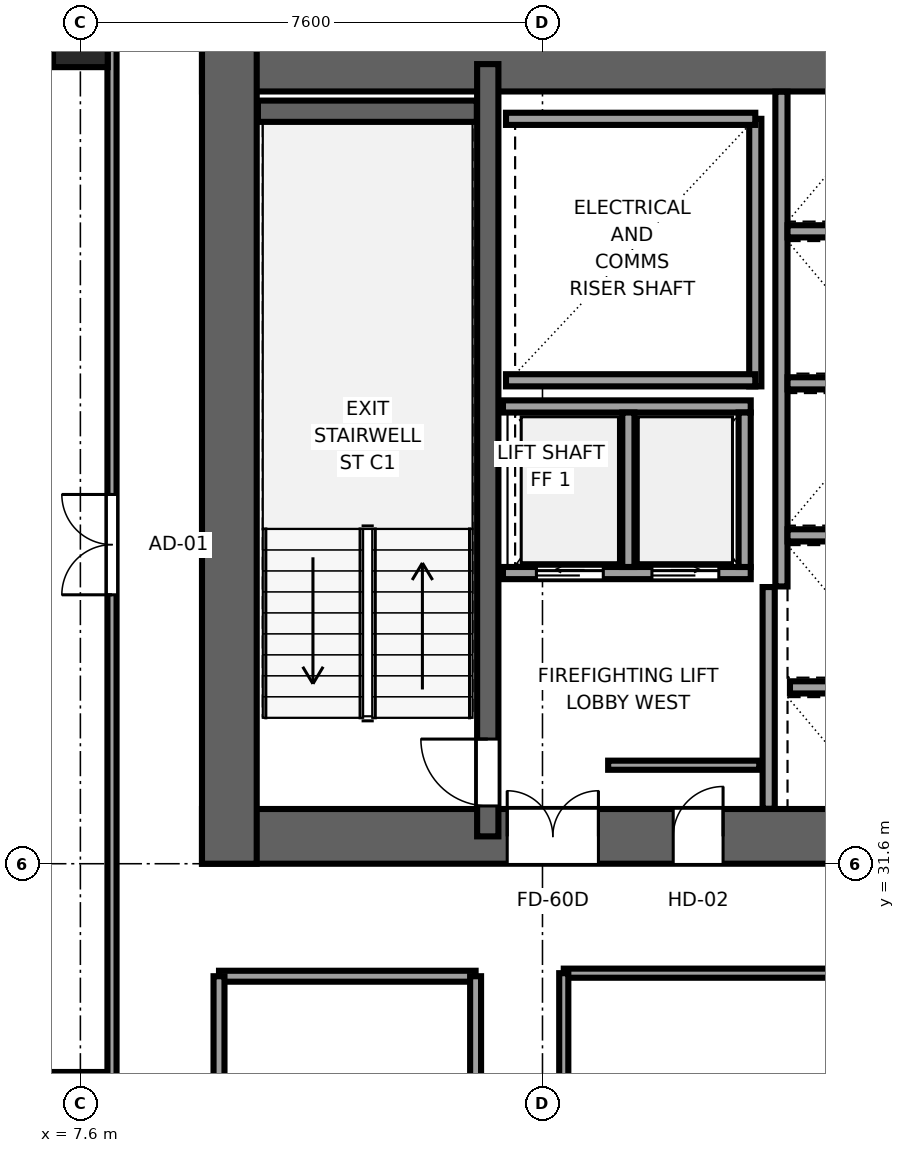
"""IFC4 building model, lengths in metres.
Left out: names, types, materials, properties, quantities, classifications, styles, units other than length and angle.
Written with IfcOpenShell. Run it as: python <this file> out.ifc"""

import sys

from ifc_helpers import new_model, si_unit, direction, frame, frame_2d, origin, origin_2d, place, context, subcontext, project, spatial, rectangle, extrude, source, transform, mapped, element, fill, save


model = new_model("IFC4")
c1 = context("Model", 3, precision=1e-05, world=origin(), true_north=direction((0.0, 1.0)))
c2 = subcontext(c1, "Body", "Model", "MODEL_VIEW")
j1 = project(units=[si_unit("LENGTHUNIT", "METRE"), si_unit("PLANEANGLEUNIT", "RADIAN")], contexts=[c1])
p1 = place(None, origin())
s1 = spatial("IfcSite", under=j1, at=p1, CompositionType="ELEMENT")
p2 = place(p1, origin())
s2 = spatial("IfcBuilding", under=s1, at=p2, CompositionType="ELEMENT")
p3 = place(p2, frame((0.0, 0.0, 88.8)))
s3 = spatial("IfcBuildingStorey", under=s2, at=p3, CompositionType="ELEMENT", Elevation=88.8)
p4 = place(p3, frame((9.6, 32.05, 0.0), z_axis=(0.0, 0.0, 1.0), x_axis=(1.0, 0.0, 0.0)))
e1 = element("IfcWall", 1, at=p4, inside=s3, PredefinedType="SHEAR", context=c2, shape_type="SweptSolid", body=[
    extrude(rectangle(XDim=26.8, YDim=0.9, at=frame_2d((13.4, 0.0))), origin(), (0.0, 0.0, 1.0), 3.55),
])
p5 = place(p4, frame((6.52, 0.0, 0.0), z_axis=(0.0, 0.0, 1.0), x_axis=(-1.0, 0.0, 0.0)))
e2 = element("IfcOpeningElement", 2, at=p5, cuts=e1, PredefinedType="OPENING", context=c2, shape_type="SweptSolid", body=[
    extrude(rectangle(XDim=1.5, YDim=2.04, at=frame_2d((0.75, 1.02))), frame((0.0, 0.46, 0.0), z_axis=(0.0, -1.0, 0.0), x_axis=(1.0, 0.0, 0.0)), (0.0, 0.0, 1.0), 0.92),
])
p6 = place(p4, frame((14.15, 0.0, 0.0), z_axis=(0.0, 0.0, 1.0), x_axis=(-1.0, 0.0, 0.0)))
e3 = element("IfcOpeningElement", 3, at=p6, cuts=e1, PredefinedType="OPENING", context=c2, shape_type="SweptSolid", body=[
    extrude(rectangle(XDim=1.5, YDim=2.04, at=frame_2d((0.75, 1.02))), frame((0.0, 0.46, 0.0), z_axis=(0.0, -1.0, 0.0), x_axis=(1.0, 0.0, 0.0)), (0.0, 0.0, 1.0), 0.92),
])
p7 = place(p4, frame((20.45, 0.0, 0.0), z_axis=(0.0, 0.0, 1.0), x_axis=(-1.0, 0.0, 0.0)))
e4 = element("IfcOpeningElement", 4, at=p7, cuts=e1, PredefinedType="OPENING", context=c2, shape_type="SweptSolid", body=[
    extrude(rectangle(XDim=1.5, YDim=2.04, at=frame_2d((0.75, 1.02))), frame((0.0, 0.46, 0.0), z_axis=(0.0, -1.0, 0.0), x_axis=(1.0, 0.0, 0.0)), (0.0, 0.0, 1.0), 0.92),
])
p8 = place(p4, frame((8.57, 0.0, 0.0), z_axis=(0.0, 0.0, 1.0), x_axis=(-1.0, 0.0, 0.0)))
e5 = element("IfcOpeningElement", 5, at=p8, cuts=e1, PredefinedType="OPENING", context=c2, shape_type="SweptSolid", body=[
    extrude(rectangle(XDim=0.82, YDim=2.01, at=frame_2d((0.41, 1.005))), frame((0.0, 0.46, 0.0), z_axis=(0.0, -1.0, 0.0), x_axis=(1.0, 0.0, 0.0)), (0.0, 0.0, 1.0), 0.92),
])
p9 = place(p3, frame((9.6, 44.75, 0.0), z_axis=(0.0, 0.0, 1.0), x_axis=(1.0, 0.0, 0.0)))
e6 = element("IfcWall", 6, at=p9, inside=s3, PredefinedType="SHEAR", context=c2, shape_type="SweptSolid", body=[
    extrude(rectangle(XDim=26.8, YDim=0.9, at=frame_2d((13.4, 0.0))), origin(), (0.0, 0.0, 1.0), 3.55),
])
p10 = place(p3, frame((10.05, 31.6, 0.0), z_axis=(0.0, 0.0, 1.0), x_axis=(0.0, 1.0, 0.0)))
e7 = element("IfcWall", 7, at=p10, inside=s3, PredefinedType="SHEAR", context=c2, shape_type="SweptSolid", body=[
    extrude(rectangle(XDim=13.6, YDim=0.9, at=frame_2d((6.8, 0.0))), origin(), (0.0, 0.0, 1.0), 3.55),
])
p11 = place(p3, frame((14.3, 32.05, 0.0), z_axis=(0.0, 0.0, 1.0), x_axis=(0.0, 1.0, 0.0)))
e8 = element("IfcWall", 8, at=p11, inside=s3, PredefinedType="SHEAR", context=c2, shape_type="SweptSolid", body=[
    extrude(rectangle(XDim=12.7, YDim=0.35, at=frame_2d((6.35, 0.0))), origin(), (0.0, 0.0, 1.0), 3.55),
])
p12 = place(p11, frame((0.5, 0.0, 0.0)))
e9 = element("IfcOpeningElement", 9, at=p12, cuts=e8, PredefinedType="OPENING", context=c2, shape_type="SweptSolid", body=[
    extrude(rectangle(XDim=1.1, YDim=2.12, at=frame_2d((0.55, 1.06))), frame((0.0, 0.185, 0.0), z_axis=(0.0, -1.0, 0.0), x_axis=(1.0, 0.0, 0.0)), (0.0, 0.0, 1.0), 0.37),
])
p13 = place(p3, frame((10.52, 43.975, 0.0), z_axis=(0.0, 0.0, 1.0), x_axis=(1.0, 0.0, 0.0)))
e10 = element("IfcWall", 10, at=p13, inside=s3, PredefinedType="SHEAR", context=c2, shape_type="SweptSolid", body=[
    extrude(rectangle(XDim=3.6, YDim=0.35, at=frame_2d((1.8, 0.0))), origin(), (0.0, 0.0, 1.0), 3.55),
])
m1 = source(origin(), c2, "Body", "SweptSolid", [
    extrude(rectangle(XDim=0.9, YDim=0.9, at=origin_2d()), origin(), (0.0, 0.0, 1.0), 3.55),
])
p14 = place(p3, frame((7.6, 45.15, 0.0), z_axis=(0.0, 0.0, 1.0), x_axis=(1.0, 0.0, 0.0)))
e11 = element("IfcColumn", 11, at=p14, inside=s3, PredefinedType="COLUMN", context=c2, shape_type="MappedRepresentation", body=[
    mapped(m1, transform((0.0, 0.0, 0.0), x_axis=(1.0, 0.0, 0.0), y_axis=(0.0, 1.0, 0.0), z_axis=(0.0, 0.0, 1.0), scale=1.0)),
])
p15 = place(p3, frame((18.7, 39.45, 0.0), z_axis=(0.0, 0.0, 1.0), x_axis=(0.0, 1.0, 0.0)))
e12 = element("IfcWall", 12, at=p15, inside=s3, PredefinedType="SOLIDWALL", context=c2, shape_type="SweptSolid", body=[
    extrude(rectangle(XDim=4.4, YDim=0.2, at=frame_2d((2.2, 0.0))), origin(), (0.0, 0.0, 1.0), 3.37),
])
for number, where, z_axis, x_axis in (
    (13, (14.6, 39.55, 0.0), (0.0, 0.0, 1.0), (1.0, 0.0, 0.0)),
    (14, (14.6, 43.85, 0.0), (0.0, 0.0, 1.0), (1.0, 0.0, 0.0)),
):
    element("IfcWall", number, at=place(p3, frame(where, z_axis=z_axis, x_axis=x_axis)), inside=s3, PredefinedType="SOLIDWALL", context=c2, shape_type="SweptSolid", body=[
        extrude(rectangle(XDim=4.1, YDim=0.2, at=frame_2d((2.05, 0.0))), origin(), (0.0, 0.0, 1.0), 3.37),
    ])
p16 = place(p3, frame((18.92, 32.504, 0.0), z_axis=(0.0, 0.0, 1.0), x_axis=(0.0, 1.0, 0.0)))
e15 = element("IfcWall", 15, at=p16, inside=s3, PredefinedType="SOLIDWALL", context=c2, shape_type="SweptSolid", body=[
    extrude(rectangle(XDim=3.646, YDim=0.2, at=frame_2d((1.823, 0.0))), origin(), (0.0, 0.0, 1.0), 3.37),
])
p17 = place(p3, frame((19.13, 36.16, 0.0), z_axis=(0.0, 0.0, 1.0), x_axis=(0.0, 1.0, 0.0)))
e16 = element("IfcWall", 16, at=p17, inside=s3, PredefinedType="SOLIDWALL", context=c2, shape_type="SweptSolid", body=[
    extrude(rectangle(XDim=8.136, YDim=0.2, at=frame_2d((4.068, 0.0))), origin(), (0.0, 0.0, 1.0), 3.37),
])
p18 = place(p3, frame((19.27, 34.5, 0.0), z_axis=(0.0, 0.0, 1.0), x_axis=(1.0, 0.0, 0.0)))
e17 = element("IfcWall", 17, at=p18, inside=s3, PredefinedType="SOLIDWALL", context=c2, shape_type="SweptSolid", body=[
    extrude(rectangle(XDim=1.8, YDim=0.2, at=frame_2d((0.9, 0.0))), origin(), (0.0, 0.0, 1.0), 3.37),
])
for number, where, z_axis, x_axis in (
    (18, (19.23, 37.0, 0.0), (0.0, 0.0, 1.0), (1.0, 0.0, 0.0)),
    (19, (19.23, 39.5, 0.0), (0.0, 0.0, 1.0), (1.0, 0.0, 0.0)),
    (20, (19.23, 42.0, 0.0), (0.0, 0.0, 1.0), (1.0, 0.0, 0.0)),
):
    element("IfcWall", number, at=place(p3, frame(where, z_axis=z_axis, x_axis=x_axis)), inside=s3, PredefinedType="SOLIDWALL", context=c2, shape_type="SweptSolid", body=[
        extrude(rectangle(XDim=1.84, YDim=0.2, at=frame_2d((0.92, 0.0))), origin(), (0.0, 0.0, 1.0), 3.37),
    ])
p19 = place(p3, frame((14.55, 36.38, 0.0), z_axis=(0.0, 0.0, 1.0), x_axis=(1.0, 0.0, 0.0)))
e21 = element("IfcWall", 21, at=p19, inside=s3, PredefinedType="SOLIDWALL", context=c2, shape_type="SweptSolid", body=[
    extrude(rectangle(XDim=4.075, YDim=0.2, at=frame_2d((2.038, 0.0))), origin(), (0.0, 0.0, 1.0), 3.37),
])
p20 = place(p19, frame((0.55, 0.0, 0.0)))
e22 = element("IfcOpeningElement", 22, at=p20, cuts=e21, PredefinedType="OPENING", context=c2, shape_type="SweptSolid", body=[
    extrude(rectangle(XDim=1.1, YDim=2.12, at=frame_2d((0.55, 1.06))), frame((0.0, 0.11, 0.0), z_axis=(0.0, -1.0, 0.0), x_axis=(1.0, 0.0, 0.0)), (0.0, 0.0, 1.0), 0.22),
])
p21 = place(p19, frame((2.45, 0.0, 0.0)))
e23 = element("IfcOpeningElement", 23, at=p21, cuts=e21, PredefinedType="OPENING", context=c2, shape_type="SweptSolid", body=[
    extrude(rectangle(XDim=1.1, YDim=2.12, at=frame_2d((0.55, 1.06))), frame((0.0, 0.11, 0.0), z_axis=(0.0, -1.0, 0.0), x_axis=(1.0, 0.0, 0.0)), (0.0, 0.0, 1.0), 0.22),
])
p22 = place(p3, frame((14.55, 39.12, 0.0), z_axis=(0.0, 0.0, 1.0), x_axis=(1.0, 0.0, 0.0)))
e24 = element("IfcWall", 24, at=p22, inside=s3, PredefinedType="SOLIDWALL", context=c2, shape_type="SweptSolid", body=[
    extrude(rectangle(XDim=4.075, YDim=0.2, at=frame_2d((2.038, 0.0))), origin(), (0.0, 0.0, 1.0), 3.37),
])
for number, where, z_axis, x_axis in (
    (25, (18.525, 36.48, 0.0), (0.0, 0.0, 1.0), (0.0, 1.0, 0.0)),
    (26, (16.613, 36.48, 0.0), (0.0, 0.0, 1.0), (0.0, 1.0, 0.0)),
):
    element("IfcWall", number, at=place(p3, frame(where, z_axis=z_axis, x_axis=x_axis)), inside=s3, PredefinedType="SOLIDWALL", context=c2, shape_type="SweptSolid", body=[
        extrude(rectangle(XDim=2.54, YDim=0.2, at=frame_2d((1.27, 0.0))), origin(), (0.0, 0.0, 1.0), 3.37),
    ])
p23 = place(p3, frame((16.28, 33.22, 0.0), z_axis=(0.0, 0.0, 1.0), x_axis=(1.0, 0.0, 0.0)))
e27 = element("IfcWall", 27, at=p23, inside=s3, PredefinedType="PARTITIONING", context=c2, shape_type="SweptSolid", body=[
    extrude(rectangle(XDim=2.485, YDim=0.15, at=frame_2d((1.242, 0.0))), origin(), (0.0, 0.0, 1.0), 3.37),
])
p24 = place(p3, frame((0.405, 28.1, 0.0), z_axis=(0.0, 0.0, 1.0), x_axis=(1.0, 0.0, 0.0)))
e28 = element("IfcWall", 28, at=p24, inside=s3, PredefinedType="PARTITIONING", context=c2, shape_type="SweptSolid", body=[
    extrude(rectangle(XDim=7.715, YDim=0.15, at=frame_2d((3.857, 0.0))), origin(), (0.0, 0.0, 1.0), 3.37),
])
p25 = place(p3, frame((8.12, 28.1, 0.0), z_axis=(0.0, 0.0, 1.0), x_axis=(0.0, 1.0, 0.0)))
e29 = element("IfcWall", 29, at=p25, inside=s3, PredefinedType="PARTITIONING", context=c2, shape_type="SweptSolid", body=[
    extrude(rectangle(XDim=17.495, YDim=0.15, at=frame_2d((8.748, 0.0))), origin(), (0.0, 0.0, 1.0), 3.37),
])
p26 = place(p25, frame((7.923, 0.0, 0.0)))
e30 = element("IfcOpeningElement", 30, at=p26, cuts=e29, PredefinedType="OPENING", context=c2, shape_type="SweptSolid", body=[
    extrude(rectangle(XDim=1.65, YDim=2.15, at=frame_2d((0.825, 1.075))), frame((0.0, 0.085, 0.0), z_axis=(0.0, -1.0, 0.0), x_axis=(1.0, 0.0, 0.0)), (0.0, 0.0, 1.0), 0.17),
])
p27 = place(p3, frame((9.88, 29.75, 0.0), z_axis=(0.0, 0.0, 1.0), x_axis=(1.0, 0.0, 0.0)))
e31 = element("IfcWall", 31, at=p27, inside=s3, PredefinedType="PARTITIONING", context=c2, shape_type="SweptSolid", body=[
    extrude(rectangle(XDim=4.22, YDim=0.18, at=frame_2d((2.11, 0.0))), origin(), (0.0, 0.0, 1.0), 3.37),
])
for number, where, z_axis, x_axis in (
    (32, (9.88, 20.5, 0.0), (0.0, 0.0, 1.0), (0.0, 1.0, 0.0)),
    (33, (14.1, 20.5, 0.0), (0.0, 0.0, 1.0), (0.0, 1.0, 0.0)),
):
    element("IfcWall", number, at=place(p3, frame(where, z_axis=z_axis, x_axis=x_axis)), inside=s3, PredefinedType="PARTITIONING", context=c2, shape_type="SweptSolid", body=[
        extrude(rectangle(XDim=9.25, YDim=0.18, at=frame_2d((4.625, 0.0))), origin(), (0.0, 0.0, 1.0), 3.37),
    ])
p28 = place(p3, frame((15.55, 29.8, 0.0), z_axis=(0.0, 0.0, 1.0), x_axis=(1.0, 0.0, 0.0)))
e34 = element("IfcWall", 34, at=p28, inside=s3, PredefinedType="PARTITIONING", context=c2, shape_type="SweptSolid", body=[
    extrude(rectangle(XDim=5.3, YDim=0.15, at=frame_2d((2.65, 0.0))), origin(), (0.0, 0.0, 1.0), 3.37),
])
p29 = place(p3, frame((15.55, 20.5, 0.0), z_axis=(0.0, 0.0, 1.0), x_axis=(0.0, 1.0, 0.0)))
e35 = element("IfcWall", 35, at=p29, inside=s3, PredefinedType="PARTITIONING", context=c2, shape_type="SweptSolid", body=[
    extrude(rectangle(XDim=9.3, YDim=0.15, at=frame_2d((4.65, 0.0))), origin(), (0.0, 0.0, 1.0), 3.37),
])
m2 = source(origin(), c2, "Body", "SweptSolid", [
    extrude(rectangle(XDim=1.1, YDim=2.12, at=frame_2d((0.55, 1.06))), frame((0.0, 0.025, 0.0), z_axis=(0.0, -1.0, 0.0), x_axis=(1.0, 0.0, 0.0)), (0.0, 0.0, 1.0), 0.05),
])
p30 = place(p12, origin())
e36 = element("IfcDoor", 36, at=p30, inside=s3, OperationType="SINGLE_SWING_RIGHT", PredefinedType="DOOR", context=c2, shape_type="MappedRepresentation", body=[
    mapped(m2, transform((0.0, 0.0, 0.0), x_axis=(1.0, 0.0, 0.0), y_axis=(0.0, 1.0, 0.0), z_axis=(0.0, 0.0, 1.0), scale=1.0)),
])
fill(e9, e36)
m3 = source(origin(), c2, "Body", "SweptSolid", [
    extrude(rectangle(XDim=1.5, YDim=2.04, at=frame_2d((0.75, 1.02))), frame((0.0, 0.025, 0.0), z_axis=(0.0, -1.0, 0.0), x_axis=(1.0, 0.0, 0.0)), (0.0, 0.0, 1.0), 0.05),
])
p31 = place(p5, origin())
e37 = element("IfcDoor", 37, at=p31, inside=s3, OperationType="DOUBLE_DOOR_SINGLE_SWING", PredefinedType="DOOR", context=c2, shape_type="MappedRepresentation", body=[
    mapped(m3, transform((0.0, 0.0, 0.0), x_axis=(1.0, 0.0, 0.0), y_axis=(0.0, 1.0, 0.0), z_axis=(0.0, 0.0, 1.0), scale=1.0)),
])
fill(e2, e37)
m4 = source(origin(), c2, "Body", "SweptSolid", [
    extrude(rectangle(XDim=0.82, YDim=2.01, at=frame_2d((0.41, 1.005))), frame((0.0, 0.025, 0.0), z_axis=(0.0, -1.0, 0.0), x_axis=(1.0, 0.0, 0.0)), (0.0, 0.0, 1.0), 0.05),
])
p32 = place(p8, origin())
e38 = element("IfcDoor", 38, at=p32, inside=s3, OperationType="SINGLE_SWING_RIGHT", PredefinedType="DOOR", context=c2, shape_type="MappedRepresentation", body=[
    mapped(m4, transform((0.0, 0.0, 0.0), x_axis=(1.0, 0.0, 0.0), y_axis=(0.0, 1.0, 0.0), z_axis=(0.0, 0.0, 1.0), scale=1.0)),
])
fill(e5, e38)
m5 = source(origin(), c2, "Body", "SweptSolid", [
    extrude(rectangle(XDim=1.1, YDim=2.12, at=frame_2d((0.55, 1.06))), frame((0.0, 0.025, 0.0), z_axis=(0.0, -1.0, 0.0), x_axis=(1.0, 0.0, 0.0)), (0.0, 0.0, 1.0), 0.05),
])
p33 = place(p20, origin())
e39 = element("IfcDoor", 39, at=p33, inside=s3, OperationType="SLIDING_TO_LEFT", PredefinedType="DOOR", context=c2, shape_type="MappedRepresentation", body=[
    mapped(m5, transform((0.0, 0.0, 0.0), x_axis=(1.0, 0.0, 0.0), y_axis=(0.0, 1.0, 0.0), z_axis=(0.0, 0.0, 1.0), scale=1.0)),
])
fill(e22, e39)
p34 = place(p21, origin())
e40 = element("IfcDoor", 40, at=p34, inside=s3, OperationType="SLIDING_TO_RIGHT", PredefinedType="DOOR", context=c2, shape_type="MappedRepresentation", body=[
    mapped(m5, transform((0.0, 0.0, 0.0), x_axis=(1.0, 0.0, 0.0), y_axis=(0.0, 1.0, 0.0), z_axis=(0.0, 0.0, 1.0), scale=1.0)),
])
fill(e23, e40)
m6 = source(origin(), c2, "Body", "SweptSolid", [
    extrude(rectangle(XDim=1.65, YDim=2.15, at=frame_2d((0.825, 1.075))), frame((0.0, 0.025, 0.0), z_axis=(0.0, -1.0, 0.0), x_axis=(1.0, 0.0, 0.0)), (0.0, 0.0, 1.0), 0.05),
])
p35 = place(p26, origin())
e41 = element("IfcDoor", 41, at=p35, inside=s3, OperationType="DOUBLE_DOOR_SINGLE_SWING", PredefinedType="DOOR", context=c2, shape_type="MappedRepresentation", body=[
    mapped(m6, transform((0.0, 0.0, 0.0), x_axis=(1.0, 0.0, 0.0), y_axis=(0.0, 1.0, 0.0), z_axis=(0.0, 0.0, 1.0), scale=1.0)),
])
fill(e30, e41)
save(model, sys.argv[1])
